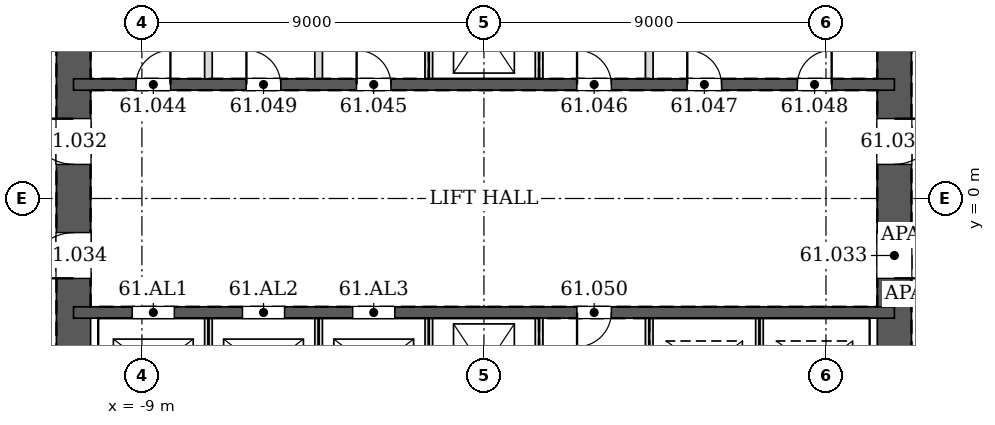
"""IFC4 building model, lengths in metres.
Left out: names, types, materials, properties, quantities, classifications, styles, units other than length and angle.
Written with IfcOpenShell. Run it as: python <this file> out.ifc"""

import sys

from ifc_helpers import new_model, si_unit, direction, frame, frame_2d, origin, place, context, subcontext, project, spatial, rectangle, extrude, element, fill, save


model = new_model("IFC4")
c1 = context("Model", 3, precision=1e-05, world=origin(), true_north=direction((0.0, 1.0)))
c2 = subcontext(c1, "Body", "Model", "MODEL_VIEW")
j1 = project(units=[si_unit("LENGTHUNIT", "METRE"), si_unit("PLANEANGLEUNIT", "RADIAN")], contexts=[c1])
p1 = place(None, origin())
s1 = spatial("IfcSite", under=j1, at=p1, CompositionType="ELEMENT")
p2 = place(p1, origin())
s2 = spatial("IfcBuilding", under=s1, at=p2, CompositionType="ELEMENT")
p3 = place(p2, frame((0.0, 0.0, 255.0)))
s3 = spatial("IfcBuildingStorey", under=s2, at=p3, CompositionType="ELEMENT", Elevation=255.0)
p4 = place(p3, frame((10.8, -10.8, 0.0), z_axis=(0.0, 0.0, 1.0), x_axis=(0.0, 1.0, 0.0)))
e1 = element("IfcWall", 1, at=p4, inside=s3, PredefinedType="SOLIDWALL", context=c2, shape_type="SweptSolid", body=[
    extrude(rectangle(XDim=21.6, YDim=0.9, at=frame_2d((10.8, 0.0))), origin(), (0.0, 0.0, 1.0), 3.4),
])
p5 = place(p4, frame((11.7, 0.0, 0.0)))
e2 = element("IfcOpeningElement", 2, at=p5, cuts=e1, PredefinedType="OPENING", context=c2, shape_type="SweptSolid", body=[
    extrude(rectangle(XDim=1.2, YDim=2.1, at=frame_2d((0.6, 1.05))), frame((0.0, 0.46, 0.0), z_axis=(0.0, -1.0, 0.0), x_axis=(1.0, 0.0, 0.0)), (0.0, 0.0, 1.0), 0.92),
])
p6 = place(p4, frame((8.7, 0.0, 0.0)))
e3 = element("IfcOpeningElement", 3, at=p6, cuts=e1, PredefinedType="OPENING", context=c2, shape_type="SweptSolid", body=[
    extrude(rectangle(XDim=1.2, YDim=2.1, at=frame_2d((0.6, 1.05))), frame((0.0, 0.46, 0.0), z_axis=(0.0, -1.0, 0.0), x_axis=(1.0, 0.0, 0.0)), (0.0, 0.0, 1.0), 0.92),
])
p7 = place(p3, frame((-10.8, 10.8, 0.0), z_axis=(0.0, 0.0, 1.0), x_axis=(0.0, -1.0, 0.0)))
e4 = element("IfcWall", 4, at=p7, inside=s3, PredefinedType="SOLIDWALL", context=c2, shape_type="SweptSolid", body=[
    extrude(rectangle(XDim=21.6, YDim=0.9, at=frame_2d((10.8, 0.0))), origin(), (0.0, 0.0, 1.0), 3.4),
])
p8 = place(p7, frame((8.7, 0.0, 0.0)))
e5 = element("IfcOpeningElement", 5, at=p8, cuts=e4, PredefinedType="OPENING", context=c2, shape_type="SweptSolid", body=[
    extrude(rectangle(XDim=1.2, YDim=2.1, at=frame_2d((0.6, 1.05))), frame((0.0, 0.46, 0.0), z_axis=(0.0, -1.0, 0.0), x_axis=(1.0, 0.0, 0.0)), (0.0, 0.0, 1.0), 0.92),
])
p9 = place(p7, frame((11.7, 0.0, 0.0)))
e6 = element("IfcOpeningElement", 6, at=p9, cuts=e4, PredefinedType="OPENING", context=c2, shape_type="SweptSolid", body=[
    extrude(rectangle(XDim=1.2, YDim=2.1, at=frame_2d((0.6, 1.05))), frame((0.0, 0.46, 0.0), z_axis=(0.0, -1.0, 0.0), x_axis=(1.0, 0.0, 0.0)), (0.0, 0.0, 1.0), 0.92),
])
p10 = place(p3, frame((-10.8, 3.0, 0.0), z_axis=(0.0, 0.0, 1.0), x_axis=(1.0, 0.0, 0.0)))
e7 = element("IfcWall", 7, at=p10, inside=s3, PredefinedType="SOLIDWALL", context=c2, shape_type="SweptSolid", body=[
    extrude(rectangle(XDim=21.6, YDim=0.3, at=frame_2d((10.8, 0.0))), origin(), (0.0, 0.0, 1.0), 3.4),
])
p11 = place(p10, frame((1.65, 0.0, 0.0)))
e8 = element("IfcOpeningElement", 8, at=p11, cuts=e7, PredefinedType="OPENING", context=c2, shape_type="SweptSolid", body=[
    extrude(rectangle(XDim=0.9, YDim=2.1, at=frame_2d((0.45, 1.05))), frame((0.0, 0.16, 0.0), z_axis=(0.0, -1.0, 0.0), x_axis=(1.0, 0.0, 0.0)), (0.0, 0.0, 1.0), 0.32),
])
p12 = place(p10, frame((7.45, 0.0, 0.0)))
e9 = element("IfcOpeningElement", 9, at=p12, cuts=e7, PredefinedType="OPENING", context=c2, shape_type="SweptSolid", body=[
    extrude(rectangle(XDim=0.9, YDim=2.1, at=frame_2d((0.45, 1.05))), frame((0.0, 0.16, 0.0), z_axis=(0.0, -1.0, 0.0), x_axis=(1.0, 0.0, 0.0)), (0.0, 0.0, 1.0), 0.32),
])
p13 = place(p10, frame((13.25, 0.0, 0.0)))
e10 = element("IfcOpeningElement", 10, at=p13, cuts=e7, PredefinedType="OPENING", context=c2, shape_type="SweptSolid", body=[
    extrude(rectangle(XDim=0.9, YDim=2.1, at=frame_2d((0.45, 1.05))), frame((0.0, 0.16, 0.0), z_axis=(0.0, -1.0, 0.0), x_axis=(1.0, 0.0, 0.0)), (0.0, 0.0, 1.0), 0.32),
])
p14 = place(p10, frame((16.15, 0.0, 0.0)))
e11 = element("IfcOpeningElement", 11, at=p14, cuts=e7, PredefinedType="OPENING", context=c2, shape_type="SweptSolid", body=[
    extrude(rectangle(XDim=0.9, YDim=2.1, at=frame_2d((0.45, 1.05))), frame((0.0, 0.16, 0.0), z_axis=(0.0, -1.0, 0.0), x_axis=(1.0, 0.0, 0.0)), (0.0, 0.0, 1.0), 0.32),
])
p15 = place(p10, frame((19.05, 0.0, 0.0)))
e12 = element("IfcOpeningElement", 12, at=p15, cuts=e7, PredefinedType="OPENING", context=c2, shape_type="SweptSolid", body=[
    extrude(rectangle(XDim=0.9, YDim=2.1, at=frame_2d((0.45, 1.05))), frame((0.0, 0.16, 0.0), z_axis=(0.0, -1.0, 0.0), x_axis=(1.0, 0.0, 0.0)), (0.0, 0.0, 1.0), 0.32),
])
p16 = place(p10, frame((4.55, 0.0, 0.0)))
e13 = element("IfcOpeningElement", 13, at=p16, cuts=e7, PredefinedType="OPENING", context=c2, shape_type="SweptSolid", body=[
    extrude(rectangle(XDim=0.9, YDim=2.1, at=frame_2d((0.45, 1.05))), frame((0.0, 0.16, 0.0), z_axis=(0.0, -1.0, 0.0), x_axis=(1.0, 0.0, 0.0)), (0.0, 0.0, 1.0), 0.32),
])
p17 = place(p3, frame((-10.8, -3.0, 0.0), z_axis=(0.0, 0.0, 1.0), x_axis=(1.0, 0.0, 0.0)))
e14 = element("IfcWall", 14, at=p17, inside=s3, PredefinedType="SOLIDWALL", context=c2, shape_type="SweptSolid", body=[
    extrude(rectangle(XDim=21.6, YDim=0.3, at=frame_2d((10.8, 0.0))), origin(), (0.0, 0.0, 1.0), 3.4),
])
p18 = place(p17, frame((13.25, 0.0, 0.0)))
e15 = element("IfcOpeningElement", 15, at=p18, cuts=e14, PredefinedType="OPENING", context=c2, shape_type="SweptSolid", body=[
    extrude(rectangle(XDim=0.9, YDim=2.1, at=frame_2d((0.45, 1.05))), frame((0.0, 0.16, 0.0), z_axis=(0.0, -1.0, 0.0), x_axis=(1.0, 0.0, 0.0)), (0.0, 0.0, 1.0), 0.32),
])
p19 = place(p17, frame((1.55, 0.0, 0.0)))
e16 = element("IfcOpeningElement", 16, at=p19, cuts=e14, PredefinedType="OPENING", context=c2, shape_type="SweptSolid", body=[
    extrude(rectangle(XDim=1.1, YDim=2.1, at=frame_2d((0.55, 1.05))), frame((0.0, 0.16, 0.0), z_axis=(0.0, -1.0, 0.0), x_axis=(1.0, 0.0, 0.0)), (0.0, 0.0, 1.0), 0.32),
])
p20 = place(p17, frame((4.45, 0.0, 0.0)))
e17 = element("IfcOpeningElement", 17, at=p20, cuts=e14, PredefinedType="OPENING", context=c2, shape_type="SweptSolid", body=[
    extrude(rectangle(XDim=1.1, YDim=2.1, at=frame_2d((0.55, 1.05))), frame((0.0, 0.16, 0.0), z_axis=(0.0, -1.0, 0.0), x_axis=(1.0, 0.0, 0.0)), (0.0, 0.0, 1.0), 0.32),
])
p21 = place(p17, frame((7.35, 0.0, 0.0)))
e18 = element("IfcOpeningElement", 18, at=p21, cuts=e14, PredefinedType="OPENING", context=c2, shape_type="SweptSolid", body=[
    extrude(rectangle(XDim=1.1, YDim=2.1, at=frame_2d((0.55, 1.05))), frame((0.0, 0.16, 0.0), z_axis=(0.0, -1.0, 0.0), x_axis=(1.0, 0.0, 0.0)), (0.0, 0.0, 1.0), 0.32),
])
for number, where, z_axis, x_axis in (
    (19, (-7.25, 3.15, 0.0), (0.0, 0.0, 1.0), (0.0, 1.0, 0.0)),
    (20, (-4.35, 3.15, 0.0), (0.0, 0.0, 1.0), (0.0, 1.0, 0.0)),
    (21, (-1.45, 3.15, 0.0), (0.0, 0.0, 1.0), (0.0, 1.0, 0.0)),
    (22, (1.45, 3.15, 0.0), (0.0, 0.0, 1.0), (0.0, 1.0, 0.0)),
    (23, (4.35, 3.15, 0.0), (0.0, 0.0, 1.0), (0.0, 1.0, 0.0)),
):
    element("IfcWall", number, at=place(p3, frame(where, z_axis=z_axis, x_axis=x_axis)), inside=s3, PredefinedType="PARTITIONING", context=c2, shape_type="SweptSolid", body=[
        extrude(rectangle(XDim=2.7, YDim=0.2, at=frame_2d((1.35, 0.0))), origin(), (0.0, 0.0, 1.0), 3.2),
    ])
for number, where, z_axis, x_axis in (
    (24, (-7.25, -5.85, 0.0), (0.0, 0.0, 1.0), (0.0, 1.0, 0.0)),
    (25, (-4.35, -5.85, 0.0), (0.0, 0.0, 1.0), (0.0, 1.0, 0.0)),
    (26, (-1.45, -5.85, 0.0), (0.0, 0.0, 1.0), (0.0, 1.0, 0.0)),
):
    element("IfcWall", number, at=place(p3, frame(where, z_axis=z_axis, x_axis=x_axis)), inside=s3, PredefinedType="PARTITIONING", context=c2, shape_type="SweptSolid", body=[
        extrude(rectangle(XDim=2.7, YDim=0.2, at=frame_2d((1.35, 0.0))), origin(), (0.0, 0.0, 1.0), 3.4),
    ])
for number, where, z_axis, x_axis in (
    (27, (1.45, -5.85, 0.0), (0.0, 0.0, 1.0), (0.0, 1.0, 0.0)),
    (28, (4.35, -5.85, 0.0), (0.0, 0.0, 1.0), (0.0, 1.0, 0.0)),
):
    element("IfcWall", number, at=place(p3, frame(where, z_axis=z_axis, x_axis=x_axis)), inside=s3, PredefinedType="PARTITIONING", context=c2, shape_type="SweptSolid", body=[
        extrude(rectangle(XDim=2.7, YDim=0.2, at=frame_2d((1.35, 0.0))), origin(), (0.0, 0.0, 1.0), 3.2),
    ])
p22 = place(p3, frame((7.25, -5.85, 0.0), z_axis=(0.0, 0.0, 1.0), x_axis=(0.0, 1.0, 0.0)))
e29 = element("IfcWall", 29, at=p22, inside=s3, PredefinedType="PARTITIONING", context=c2, shape_type="SweptSolid", body=[
    extrude(rectangle(XDim=2.7, YDim=0.2, at=frame_2d((1.35, 0.0))), origin(), (0.0, 0.0, 1.0), 3.4),
])
p23 = place(p5, frame((1.2, 0.0, 0.0), z_axis=(0.0, 0.0, 1.0), x_axis=(-1.0, 0.0, 0.0)))
e30 = element("IfcDoor", 30, at=p23, inside=s3, OperationType="SINGLE_SWING_LEFT", PredefinedType="DOOR", context=c2, shape_type="SweptSolid", body=[
    extrude(rectangle(XDim=1.2, YDim=2.1, at=frame_2d((0.6, 1.05))), frame((0.0, 0.025, 0.0), z_axis=(0.0, -1.0, 0.0), x_axis=(1.0, 0.0, 0.0)), (0.0, 0.0, 1.0), 0.05),
])
fill(e2, e30)
p24 = place(p8, frame((1.2, 0.0, 0.0), z_axis=(0.0, 0.0, 1.0), x_axis=(-1.0, 0.0, 0.0)))
e31 = element("IfcDoor", 31, at=p24, inside=s3, OperationType="SINGLE_SWING_RIGHT", PredefinedType="DOOR", context=c2, shape_type="SweptSolid", body=[
    extrude(rectangle(XDim=1.2, YDim=2.1, at=frame_2d((0.6, 1.05))), frame((0.0, 0.025, 0.0), z_axis=(0.0, -1.0, 0.0), x_axis=(1.0, 0.0, 0.0)), (0.0, 0.0, 1.0), 0.05),
])
fill(e5, e31)
p25 = place(p6, frame((1.2, 0.0, 0.0), z_axis=(0.0, 0.0, 1.0), x_axis=(-1.0, 0.0, 0.0)))
e32 = element("IfcDoor", 32, at=p25, inside=s3, OperationType="SINGLE_SWING_RIGHT", PredefinedType="DOOR", context=c2, shape_type="SweptSolid", body=[
    extrude(rectangle(XDim=1.2, YDim=2.1, at=frame_2d((0.6, 1.05))), frame((0.0, 0.025, 0.0), z_axis=(0.0, -1.0, 0.0), x_axis=(1.0, 0.0, 0.0)), (0.0, 0.0, 1.0), 0.05),
])
fill(e3, e32)
p26 = place(p9, frame((1.2, 0.0, 0.0), z_axis=(0.0, 0.0, 1.0), x_axis=(-1.0, 0.0, 0.0)))
e33 = element("IfcDoor", 33, at=p26, inside=s3, OperationType="SINGLE_SWING_LEFT", PredefinedType="DOOR", context=c2, shape_type="SweptSolid", body=[
    extrude(rectangle(XDim=1.2, YDim=2.1, at=frame_2d((0.6, 1.05))), frame((0.0, 0.025, 0.0), z_axis=(0.0, -1.0, 0.0), x_axis=(1.0, 0.0, 0.0)), (0.0, 0.0, 1.0), 0.05),
])
fill(e6, e33)
p27 = place(p11, origin())
e34 = element("IfcDoor", 34, at=p27, inside=s3, OperationType="SINGLE_SWING_RIGHT", PredefinedType="DOOR", context=c2, shape_type="SweptSolid", body=[
    extrude(rectangle(XDim=0.9, YDim=2.1, at=frame_2d((0.45, 1.05))), frame((0.0, 0.025, 0.0), z_axis=(0.0, -1.0, 0.0), x_axis=(1.0, 0.0, 0.0)), (0.0, 0.0, 1.0), 0.05),
])
fill(e8, e34)
p28 = place(p12, origin())
e35 = element("IfcDoor", 35, at=p28, inside=s3, OperationType="SINGLE_SWING_LEFT", PredefinedType="DOOR", context=c2, shape_type="SweptSolid", body=[
    extrude(rectangle(XDim=0.9, YDim=2.1, at=frame_2d((0.45, 1.05))), frame((0.0, 0.025, 0.0), z_axis=(0.0, -1.0, 0.0), x_axis=(1.0, 0.0, 0.0)), (0.0, 0.0, 1.0), 0.05),
])
fill(e9, e35)
p29 = place(p13, origin())
e36 = element("IfcDoor", 36, at=p29, inside=s3, OperationType="SINGLE_SWING_LEFT", PredefinedType="DOOR", context=c2, shape_type="SweptSolid", body=[
    extrude(rectangle(XDim=0.9, YDim=2.1, at=frame_2d((0.45, 1.05))), frame((0.0, 0.025, 0.0), z_axis=(0.0, -1.0, 0.0), x_axis=(1.0, 0.0, 0.0)), (0.0, 0.0, 1.0), 0.05),
])
fill(e10, e36)
p30 = place(p14, origin())
e37 = element("IfcDoor", 37, at=p30, inside=s3, OperationType="SINGLE_SWING_LEFT", PredefinedType="DOOR", context=c2, shape_type="SweptSolid", body=[
    extrude(rectangle(XDim=0.9, YDim=2.1, at=frame_2d((0.45, 1.05))), frame((0.0, 0.025, 0.0), z_axis=(0.0, -1.0, 0.0), x_axis=(1.0, 0.0, 0.0)), (0.0, 0.0, 1.0), 0.05),
])
fill(e11, e37)
p31 = place(p15, origin())
e38 = element("IfcDoor", 38, at=p31, inside=s3, OperationType="SINGLE_SWING_RIGHT", PredefinedType="DOOR", context=c2, shape_type="SweptSolid", body=[
    extrude(rectangle(XDim=0.9, YDim=2.1, at=frame_2d((0.45, 1.05))), frame((0.0, 0.025, 0.0), z_axis=(0.0, -1.0, 0.0), x_axis=(1.0, 0.0, 0.0)), (0.0, 0.0, 1.0), 0.05),
])
fill(e12, e38)
p32 = place(p16, origin())
e39 = element("IfcDoor", 39, at=p32, inside=s3, OperationType="SINGLE_SWING_LEFT", PredefinedType="DOOR", context=c2, shape_type="SweptSolid", body=[
    extrude(rectangle(XDim=0.9, YDim=2.1, at=frame_2d((0.45, 1.05))), frame((0.0, 0.025, 0.0), z_axis=(0.0, -1.0, 0.0), x_axis=(1.0, 0.0, 0.0)), (0.0, 0.0, 1.0), 0.05),
])
fill(e13, e39)
p33 = place(p18, frame((0.9, 0.0, 0.0), z_axis=(0.0, 0.0, 1.0), x_axis=(-1.0, 0.0, 0.0)))
e40 = element("IfcDoor", 40, at=p33, inside=s3, OperationType="SINGLE_SWING_RIGHT", PredefinedType="DOOR", context=c2, shape_type="SweptSolid", body=[
    extrude(rectangle(XDim=0.9, YDim=2.1, at=frame_2d((0.45, 1.05))), frame((0.0, 0.025, 0.0), z_axis=(0.0, -1.0, 0.0), x_axis=(1.0, 0.0, 0.0)), (0.0, 0.0, 1.0), 0.05),
])
fill(e15, e40)
p34 = place(p19, origin())
e41 = element("IfcDoor", 41, at=p34, inside=s3, OperationType="DOUBLE_DOOR_SLIDING", PredefinedType="DOOR", context=c2, shape_type="SweptSolid", body=[
    extrude(rectangle(XDim=1.1, YDim=2.1, at=frame_2d((0.55, 1.05))), frame((0.0, 0.025, 0.0), z_axis=(0.0, -1.0, 0.0), x_axis=(1.0, 0.0, 0.0)), (0.0, 0.0, 1.0), 0.05),
])
fill(e16, e41)
p35 = place(p20, origin())
e42 = element("IfcDoor", 42, at=p35, inside=s3, OperationType="DOUBLE_DOOR_SLIDING", PredefinedType="DOOR", context=c2, shape_type="SweptSolid", body=[
    extrude(rectangle(XDim=1.1, YDim=2.1, at=frame_2d((0.55, 1.05))), frame((0.0, 0.025, 0.0), z_axis=(0.0, -1.0, 0.0), x_axis=(1.0, 0.0, 0.0)), (0.0, 0.0, 1.0), 0.05),
])
fill(e17, e42)
p36 = place(p21, origin())
e43 = element("IfcDoor", 43, at=p36, inside=s3, OperationType="DOUBLE_DOOR_SLIDING", PredefinedType="DOOR", context=c2, shape_type="SweptSolid", body=[
    extrude(rectangle(XDim=1.1, YDim=2.1, at=frame_2d((0.55, 1.05))), frame((0.0, 0.025, 0.0), z_axis=(0.0, -1.0, 0.0), x_axis=(1.0, 0.0, 0.0)), (0.0, 0.0, 1.0), 0.05),
])
fill(e18, e43)
save(model, sys.argv[1])
